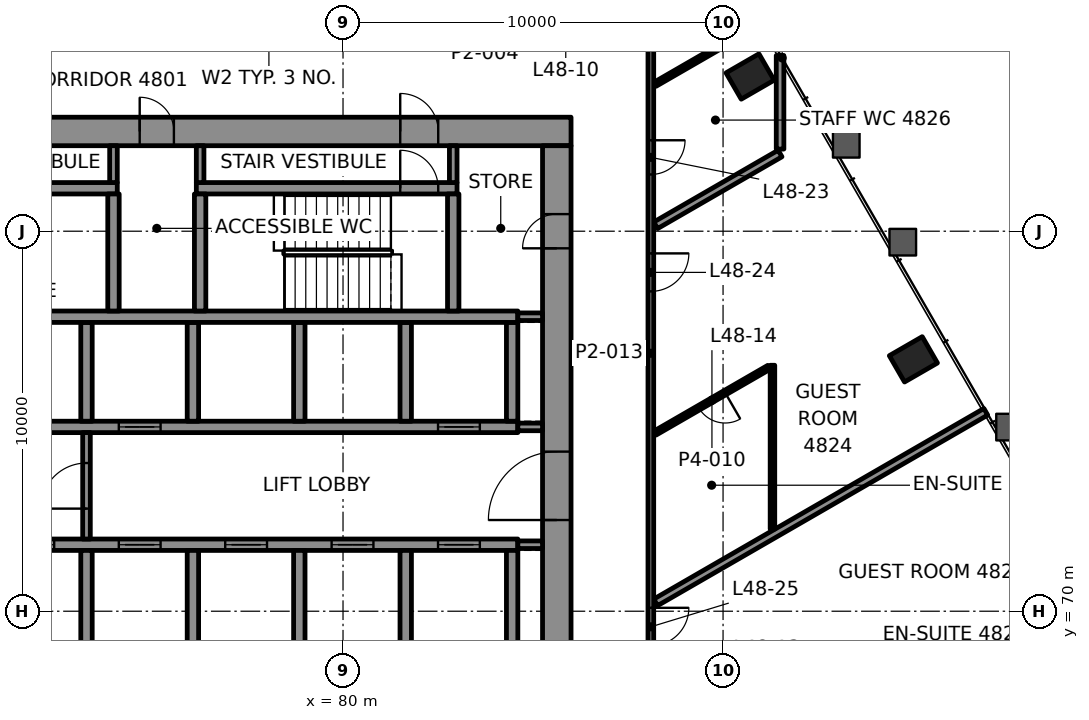
"""IFC4 building model, lengths in metres.
Left out: names, types, materials, properties, quantities, classifications, styles, units other than length and angle.
Written with IfcOpenShell. Run it as: python <this file> out.ifc"""

import sys

from ifc_helpers import new_model, si_unit, direction, frame, frame_2d, origin, origin_2d, place, context, subcontext, project, spatial, rectangle, hollow_rectangle, extrude, element, fill, save


model = new_model("IFC4")
c1 = context("Model", 3, precision=1e-05, world=origin(), true_north=direction((0.0, 1.0)))
c2 = subcontext(c1, "Body", "Model", "MODEL_VIEW")
j1 = project(units=[si_unit("LENGTHUNIT", "METRE"), si_unit("PLANEANGLEUNIT", "RADIAN")], contexts=[c1])
p1 = place(None, origin())
s1 = spatial("IfcSite", under=j1, at=p1, CompositionType="ELEMENT")
p2 = place(p1, origin())
s2 = spatial("IfcBuilding", under=s1, at=p2, CompositionType="ELEMENT")
p3 = place(p2, frame((0.0, 0.0, 206.5)))
s3 = spatial("IfcBuildingStorey", under=s2, at=p3, CompositionType="ELEMENT", Elevation=206.5)
for number, where, z_axis, x_axis in (
    (1, (95.008, 76.628, -0.0), (0.0, 0.0, 1.0), (-0.5, 0.866, 0.0)),
    (2, (90.711, 84.071, -0.0), (0.0, 0.0, 1.0), (-0.5, 0.866, 0.0)),
):
    element("IfcColumn", number, at=place(p3, frame(where, z_axis=z_axis, x_axis=x_axis)), inside=s3, PredefinedType="COLUMN", context=c2, shape_type="SweptSolid", body=[
        extrude(hollow_rectangle(XDim=0.8, YDim=1.0, WallThickness=0.05, at=origin_2d()), origin(), (0.0, 0.0, 1.0), 3.9),
    ])
p4 = place(p3, frame((64.0, 82.625, 0.0), z_axis=(0.0, 0.0, 1.0), x_axis=(1.0, 0.0, 0.0)))
e3 = element("IfcWall", 3, at=p4, inside=s3, PredefinedType="SHEAR", context=c2, shape_type="SweptSolid", body=[
    extrude(rectangle(XDim=22.0, YDim=0.75, at=frame_2d((11.0, 0.0))), origin(), (0.0, 0.0, 1.0), 3.7),
])
p5 = place(p4, frame((3.695, 0.0, 0.0)))
e4 = element("IfcOpeningElement", 4, at=p5, cuts=e3, PredefinedType="OPENING", context=c2, shape_type="SweptSolid", body=[
    extrude(rectangle(XDim=1.0, YDim=2.1, at=frame_2d((0.5, 1.05))), frame((0.0, 0.385, 0.0), z_axis=(0.0, -1.0, 0.0), x_axis=(1.0, 0.0, 0.0)), (0.0, 0.0, 1.0), 0.77),
])
p6 = place(p4, frame((17.505, 0.0, 0.0)))
e5 = element("IfcOpeningElement", 5, at=p6, cuts=e3, PredefinedType="OPENING", context=c2, shape_type="SweptSolid", body=[
    extrude(rectangle(XDim=1.0, YDim=2.1, at=frame_2d((0.5, 1.05))), frame((0.0, 0.385, 0.0), z_axis=(0.0, -1.0, 0.0), x_axis=(1.0, 0.0, 0.0)), (0.0, 0.0, 1.0), 0.77),
])
p7 = place(p4, frame((10.65, 0.0, 0.0)))
e6 = element("IfcOpeningElement", 6, at=p7, cuts=e3, PredefinedType="OPENING", context=c2, shape_type="SweptSolid", body=[
    extrude(rectangle(XDim=0.9, YDim=2.1, at=frame_2d((0.45, 1.05))), frame((0.0, 0.385, 0.0), z_axis=(0.0, -1.0, 0.0), x_axis=(1.0, 0.0, 0.0)), (0.0, 0.0, 1.0), 0.77),
])
p8 = place(p3, frame((85.625, 67.75, 0.0), z_axis=(0.0, 0.0, 1.0), x_axis=(0.0, 1.0, 0.0)))
e7 = element("IfcWall", 7, at=p8, inside=s3, PredefinedType="SHEAR", context=c2, shape_type="SweptSolid", body=[
    extrude(rectangle(XDim=14.5, YDim=0.75, at=frame_2d((7.25, 0.0))), origin(), (0.0, 0.0, 1.0), 3.7),
])
p9 = place(p8, frame((4.65, 0.0, 0.0)))
e8 = element("IfcOpeningElement", 8, at=p9, cuts=e7, PredefinedType="OPENING", context=c2, shape_type="SweptSolid", body=[
    extrude(rectangle(XDim=1.8, YDim=2.1, at=frame_2d((0.9, 1.05))), frame((0.0, 0.385, 0.0), z_axis=(0.0, -1.0, 0.0), x_axis=(1.0, 0.0, 0.0)), (0.0, 0.0, 1.0), 0.77),
])
p10 = place(p8, frame((11.8, 0.0, 0.0)))
e9 = element("IfcOpeningElement", 9, at=p10, cuts=e7, PredefinedType="OPENING", context=c2, shape_type="SweptSolid", body=[
    extrude(rectangle(XDim=0.9, YDim=2.1, at=frame_2d((0.45, 1.05))), frame((0.0, 0.385, 0.0), z_axis=(0.0, -1.0, 0.0), x_axis=(1.0, 0.0, 0.0)), (0.0, 0.0, 1.0), 0.77),
])
p11 = place(p3, frame((70.3, 71.75, 0.0), z_axis=(0.0, 0.0, 1.0), x_axis=(1.0, 0.0, 0.0)))
e10 = element("IfcWall", 10, at=p11, inside=s3, PredefinedType="SHEAR", context=c2, shape_type="SweptSolid", body=[
    extrude(rectangle(XDim=14.3, YDim=0.3, at=frame_2d((7.15, 0.0))), origin(), (0.0, 0.0, 1.0), 3.7),
])
p12 = place(p11, frame((1.0, 0.0, 0.0)))
e11 = element("IfcOpeningElement", 11, at=p12, cuts=e10, PredefinedType="OPENING", context=c2, shape_type="SweptSolid", body=[
    extrude(rectangle(XDim=1.1, YDim=2.1, at=frame_2d((0.55, 1.05))), frame((0.0, 0.16, 0.0), z_axis=(0.0, -1.0, 0.0), x_axis=(1.0, 0.0, 0.0)), (0.0, 0.0, 1.0), 0.32),
])
p13 = place(p11, frame((3.8, 0.0, 0.0)))
e12 = element("IfcOpeningElement", 12, at=p13, cuts=e10, PredefinedType="OPENING", context=c2, shape_type="SweptSolid", body=[
    extrude(rectangle(XDim=1.1, YDim=2.1, at=frame_2d((0.55, 1.05))), frame((0.0, 0.16, 0.0), z_axis=(0.0, -1.0, 0.0), x_axis=(1.0, 0.0, 0.0)), (0.0, 0.0, 1.0), 0.32),
])
p14 = place(p11, frame((6.6, 0.0, 0.0)))
e13 = element("IfcOpeningElement", 13, at=p14, cuts=e10, PredefinedType="OPENING", context=c2, shape_type="SweptSolid", body=[
    extrude(rectangle(XDim=1.1, YDim=2.1, at=frame_2d((0.55, 1.05))), frame((0.0, 0.16, 0.0), z_axis=(0.0, -1.0, 0.0), x_axis=(1.0, 0.0, 0.0)), (0.0, 0.0, 1.0), 0.32),
])
p15 = place(p11, frame((9.4, 0.0, 0.0)))
e14 = element("IfcOpeningElement", 14, at=p15, cuts=e10, PredefinedType="OPENING", context=c2, shape_type="SweptSolid", body=[
    extrude(rectangle(XDim=1.1, YDim=2.1, at=frame_2d((0.55, 1.05))), frame((0.0, 0.16, 0.0), z_axis=(0.0, -1.0, 0.0), x_axis=(1.0, 0.0, 0.0)), (0.0, 0.0, 1.0), 0.32),
])
p16 = place(p11, frame((12.2, 0.0, 0.0)))
e15 = element("IfcOpeningElement", 15, at=p16, cuts=e10, PredefinedType="OPENING", context=c2, shape_type="SweptSolid", body=[
    extrude(rectangle(XDim=1.1, YDim=2.1, at=frame_2d((0.55, 1.05))), frame((0.0, 0.16, 0.0), z_axis=(0.0, -1.0, 0.0), x_axis=(1.0, 0.0, 0.0)), (0.0, 0.0, 1.0), 0.32),
])
p17 = place(p3, frame((70.3, 74.85, 0.0), z_axis=(0.0, 0.0, 1.0), x_axis=(1.0, 0.0, 0.0)))
e16 = element("IfcWall", 16, at=p17, inside=s3, PredefinedType="SHEAR", context=c2, shape_type="SweptSolid", body=[
    extrude(rectangle(XDim=14.3, YDim=0.3, at=frame_2d((7.15, 0.0))), origin(), (0.0, 0.0, 1.0), 3.7),
])
p18 = place(p17, frame((3.8, 0.0, 0.0)))
e17 = element("IfcOpeningElement", 17, at=p18, cuts=e16, PredefinedType="OPENING", context=c2, shape_type="SweptSolid", body=[
    extrude(rectangle(XDim=1.1, YDim=2.1, at=frame_2d((0.55, 1.05))), frame((0.0, 0.16, 0.0), z_axis=(0.0, -1.0, 0.0), x_axis=(1.0, 0.0, 0.0)), (0.0, 0.0, 1.0), 0.32),
])
p19 = place(p17, frame((12.2, 0.0, 0.0)))
e18 = element("IfcOpeningElement", 18, at=p19, cuts=e16, PredefinedType="OPENING", context=c2, shape_type="SweptSolid", body=[
    extrude(rectangle(XDim=1.1, YDim=2.1, at=frame_2d((0.55, 1.05))), frame((0.0, 0.16, 0.0), z_axis=(0.0, -1.0, 0.0), x_axis=(1.0, 0.0, 0.0)), (0.0, 0.0, 1.0), 0.32),
])
for number, where, z_axis, x_axis in (
    (19, (73.25, 69.0, 0.0), (0.0, 0.0, 1.0), (0.0, 1.0, 0.0)),
    (20, (73.25, 75.0, 0.0), (0.0, 0.0, 1.0), (0.0, 1.0, 0.0)),
    (21, (76.05, 69.0, 0.0), (0.0, 0.0, 1.0), (0.0, 1.0, 0.0)),
    (22, (76.05, 75.0, 0.0), (0.0, 0.0, 1.0), (0.0, 1.0, 0.0)),
    (23, (78.85, 69.0, 0.0), (0.0, 0.0, 1.0), (0.0, 1.0, 0.0)),
    (24, (78.85, 75.0, 0.0), (0.0, 0.0, 1.0), (0.0, 1.0, 0.0)),
    (25, (81.65, 69.0, 0.0), (0.0, 0.0, 1.0), (0.0, 1.0, 0.0)),
    (26, (81.65, 75.0, 0.0), (0.0, 0.0, 1.0), (0.0, 1.0, 0.0)),
    (27, (84.45, 69.0, 0.0), (0.0, 0.0, 1.0), (0.0, 1.0, 0.0)),
    (28, (84.45, 75.0, 0.0), (0.0, 0.0, 1.0), (0.0, 1.0, 0.0)),
):
    element("IfcWall", number, at=place(p3, frame(where, z_axis=z_axis, x_axis=x_axis)), inside=s3, PredefinedType="SHEAR", context=c2, shape_type="SweptSolid", body=[
        extrude(rectangle(XDim=2.6, YDim=0.3, at=frame_2d((1.3, 0.0))), origin(), (0.0, 0.0, 1.0), 3.7),
    ])
p20 = place(p3, frame((67.15, 77.75, 0.0), z_axis=(0.0, 0.0, 1.0), x_axis=(1.0, 0.0, 0.0)))
e29 = element("IfcWall", 29, at=p20, inside=s3, PredefinedType="SHEAR", context=c2, shape_type="SweptSolid", body=[
    extrude(rectangle(XDim=17.45, YDim=0.3, at=frame_2d((8.725, 0.0))), origin(), (0.0, 0.0, 1.0), 3.7),
])
p21 = place(p20, frame((0.545, 0.0, 0.0)))
e30 = element("IfcOpeningElement", 30, at=p21, cuts=e29, PredefinedType="OPENING", context=c2, shape_type="SweptSolid", body=[
    extrude(rectangle(XDim=1.0, YDim=2.1, at=frame_2d((0.5, 1.05))), frame((0.0, 0.16, 0.0), z_axis=(0.0, -1.0, 0.0), x_axis=(1.0, 0.0, 0.0)), (0.0, 0.0, 1.0), 0.32),
])
p22 = place(p3, frame((67.15, 81.13, 0.0), z_axis=(0.0, 0.0, 1.0), x_axis=(1.0, 0.0, 0.0)))
e31 = element("IfcWall", 31, at=p22, inside=s3, PredefinedType="SHEAR", context=c2, shape_type="SweptSolid", body=[
    extrude(rectangle(XDim=6.91, YDim=0.3, at=frame_2d((3.455, 0.0))), origin(), (0.0, 0.0, 1.0), 3.7),
])
p23 = place(p22, frame((0.545, 0.0, 0.0)))
e32 = element("IfcOpeningElement", 32, at=p23, cuts=e31, PredefinedType="OPENING", context=c2, shape_type="SweptSolid", body=[
    extrude(rectangle(XDim=1.0, YDim=2.1, at=frame_2d((0.5, 1.05))), frame((0.0, 0.16, 0.0), z_axis=(0.0, -1.0, 0.0), x_axis=(1.0, 0.0, 0.0)), (0.0, 0.0, 1.0), 0.32),
])
p24 = place(p3, frame((76.14, 81.13, 0.0), z_axis=(0.0, 0.0, 1.0), x_axis=(1.0, 0.0, 0.0)))
e33 = element("IfcWall", 33, at=p24, inside=s3, PredefinedType="SHEAR", context=c2, shape_type="SweptSolid", body=[
    extrude(rectangle(XDim=6.86, YDim=0.3, at=frame_2d((3.43, 0.0))), origin(), (0.0, 0.0, 1.0), 3.7),
])
p25 = place(p24, frame((5.365, 0.0, 0.0)))
e34 = element("IfcOpeningElement", 34, at=p25, cuts=e33, PredefinedType="OPENING", context=c2, shape_type="SweptSolid", body=[
    extrude(rectangle(XDim=1.0, YDim=2.1, at=frame_2d((0.5, 1.05))), frame((0.0, 0.16, 0.0), z_axis=(0.0, -1.0, 0.0), x_axis=(1.0, 0.0, 0.0)), (0.0, 0.0, 1.0), 0.32),
])
for number, where, z_axis, x_axis in (
    (35, (73.96, 77.9, 0.0), (0.0, 0.0, 1.0), (0.0, 1.0, 0.0)),
    (36, (76.24, 77.9, 0.0), (0.0, 0.0, 1.0), (0.0, 1.0, 0.0)),
    (37, (82.9, 77.9, 0.0), (0.0, 0.0, 1.0), (0.0, 1.0, 0.0)),
):
    element("IfcWall", number, at=place(p3, frame(where, z_axis=z_axis, x_axis=x_axis)), inside=s3, PredefinedType="SHEAR", context=c2, shape_type="SweptSolid", body=[
        extrude(rectangle(XDim=3.08, YDim=0.3, at=frame_2d((1.54, 0.0))), origin(), (0.0, 0.0, 1.0), 3.7),
    ])
p26 = place(p3, frame((88.227, 70.233, 0.0), z_axis=(0.0, 0.0, 1.0), x_axis=(0.866032780528, 0.499987222889, 0.0)))
e38 = element("IfcWall", 38, at=p26, inside=s3, PredefinedType="PARTITIONING", context=c2, shape_type="SweptSolid", body=[
    extrude(rectangle(XDim=10.031, YDim=0.2, at=frame_2d((5.015, 0.0))), origin(), (0.0, 0.0, 1.0), 3.022),
])
p27 = place(p3, frame((91.205, 76.418, 0.0), z_axis=(0.0, 0.0, 1.0), x_axis=(-0.865997524453, -0.50004828531, 0.0)))
e39 = element("IfcWall", 39, at=p27, inside=s3, PredefinedType="PARTITIONING", context=c2, shape_type="SweptSolid", body=[
    extrude(rectangle(XDim=3.459, YDim=0.12, at=frame_2d((1.729, 0.0))), origin(), (0.0, 0.0, 1.0), 3.1),
])
p28 = place(p27, frame((1.33, 0.0, 0.0)))
e40 = element("IfcOpeningElement", 40, at=p28, cuts=e39, PredefinedType="OPENING", context=c2, shape_type="SweptSolid", body=[
    extrude(rectangle(XDim=0.8, YDim=2.1, at=frame_2d((0.4, 1.05))), frame((0.0, 0.07, 0.0), z_axis=(0.0, -1.0, 0.0), x_axis=(1.0, 0.0, 0.0)), (0.0, 0.0, 1.0), 0.14),
])
p29 = place(p3, frame((88.227, 80.155, 0.0), z_axis=(0.0, 0.0, 1.0), x_axis=(0.86599624775, 0.500050496333, 0.0)))
e41 = element("IfcWall", 41, at=p29, inside=s3, PredefinedType="PARTITIONING", context=c2, shape_type="SweptSolid", body=[
    extrude(rectangle(XDim=3.779, YDim=0.2, at=frame_2d((1.89, 0.0))), origin(), (0.0, 0.0, 1.0), 3.1),
])
p30 = place(p3, frame((88.21, 83.867, 0.0), z_axis=(0.0, 0.0, 1.0), x_axis=(0.86605210011, 0.499953757757, 0.0)))
e42 = element("IfcWall", 42, at=p30, inside=s3, PredefinedType="PARTITIONING", context=c2, shape_type="SweptSolid", body=[
    extrude(rectangle(XDim=3.228, YDim=0.12, at=frame_2d((1.614, 0.0))), origin(), (0.0, 0.0, 1.0), 3.022),
])
p31 = place(p3, frame((91.5, 82.161, 0.0), z_axis=(0.0, 0.0, 1.0), x_axis=(0.0, 1.0, 0.0)))
e43 = element("IfcWall", 43, at=p31, inside=s3, PredefinedType="PARTITIONING", context=c2, shape_type="SweptSolid", body=[
    extrude(rectangle(XDim=2.464, YDim=0.2, at=frame_2d((1.232, 0.0))), origin(), (0.0, 0.0, 1.0), 3.022),
])
p32 = place(p3, frame((91.3, 72.162, 0.0), z_axis=(0.0, 0.0, 1.0), x_axis=(0.0, 1.0, 0.0)))
e44 = element("IfcWall", 44, at=p32, inside=s3, PredefinedType="PARTITIONING", context=c2, shape_type="SweptSolid", body=[
    extrude(rectangle(XDim=4.31, YDim=0.12, at=frame_2d((2.155, 0.0))), origin(), (0.0, 0.0, 1.0), 3.1),
])
p33 = place(p3, frame((88.1, 85.1, 0.0), z_axis=(0.0, 0.0, 1.0), x_axis=(0.0, -1.0, 0.0)))
e45 = element("IfcWall", 45, at=p33, inside=s3, PredefinedType="PARTITIONING", context=c2, shape_type="SweptSolid", body=[
    extrude(rectangle(XDim=16.624, YDim=0.15, at=frame_2d((8.312, 0.0))), origin(), (0.0, 0.0, 1.0), 3.1),
])
p34 = place(p33, frame((2.707, 0.0, 0.0)))
e46 = element("IfcOpeningElement", 46, at=p34, cuts=e45, PredefinedType="OPENING", context=c2, shape_type="SweptSolid", body=[
    extrude(rectangle(XDim=0.9, YDim=2.1, at=frame_2d((0.45, 1.05))), frame((0.0, 0.085, 0.0), z_axis=(0.0, -1.0, 0.0), x_axis=(1.0, 0.0, 0.0)), (0.0, 0.0, 1.0), 0.17),
])
p35 = place(p33, frame((5.684, 0.0, 0.0)))
e47 = element("IfcOpeningElement", 47, at=p35, cuts=e45, PredefinedType="OPENING", context=c2, shape_type="SweptSolid", body=[
    extrude(rectangle(XDim=1.0, YDim=2.1, at=frame_2d((0.5, 1.05))), frame((0.0, 0.085, 0.0), z_axis=(0.0, -1.0, 0.0), x_axis=(1.0, 0.0, 0.0)), (0.0, 0.0, 1.0), 0.17),
])
p36 = place(p33, frame((15.01, 0.0, 0.0)))
e48 = element("IfcOpeningElement", 48, at=p36, cuts=e45, PredefinedType="OPENING", context=c2, shape_type="SweptSolid", body=[
    extrude(rectangle(XDim=1.0, YDim=2.1, at=frame_2d((0.5, 1.05))), frame((0.0, 0.085, 0.0), z_axis=(0.0, -1.0, 0.0), x_axis=(1.0, 0.0, 0.0)), (0.0, 0.0, 1.0), 0.17),
])
for number, where, z_axis, x_axis in (
    (49, (84.6, 71.75, 0.0), (0.0, 0.0, 1.0), (1.0, 0.0, 0.0)),
    (50, (84.6, 74.85, 0.0), (0.0, 0.0, 1.0), (1.0, 0.0, 0.0)),
    (51, (84.6, 77.75, 0.0), (0.0, 0.0, 1.0), (1.0, 0.0, 0.0)),
):
    element("IfcWall", number, at=place(p3, frame(where, z_axis=z_axis, x_axis=x_axis)), inside=s3, PredefinedType="PARTITIONING", context=c2, shape_type="SweptSolid", body=[
        extrude(rectangle(XDim=0.65, YDim=0.2, at=frame_2d((0.325, 0.0))), origin(), (0.0, 0.0, 1.0), 3.7),
    ])
p37 = place(p3, frame((73.25, 71.9, 0.0), z_axis=(0.0, 0.0, 1.0), x_axis=(0.0, 1.0, 0.0)))
e52 = element("IfcWall", 52, at=p37, inside=s3, PredefinedType="PARTITIONING", context=c2, shape_type="SweptSolid", body=[
    extrude(rectangle(XDim=2.8, YDim=0.2, at=frame_2d((1.4, 0.0))), origin(), (0.0, 0.0, 1.0), 3.7),
])
p38 = place(p37, frame((0.8, 0.0, 0.0)))
e53 = element("IfcOpeningElement", 53, at=p38, cuts=e52, PredefinedType="OPENING", context=c2, shape_type="SweptSolid", body=[
    extrude(rectangle(XDim=1.2, YDim=2.1, at=frame_2d((0.6, 1.05))), frame((0.0, 0.11, 0.0), z_axis=(0.0, -1.0, 0.0), x_axis=(1.0, 0.0, 0.0)), (0.0, 0.0, 1.0), 0.22),
])
for number, where, z_axis, x_axis in (
    (54, (73.96, 81.28, 0.0), (0.0, 0.0, 1.0), (0.0, 1.0, 0.0)),
    (55, (76.24, 81.28, 0.0), (0.0, 0.0, 1.0), (0.0, 1.0, 0.0)),
    (56, (82.9, 81.28, 0.0), (0.0, 0.0, 1.0), (0.0, 1.0, 0.0)),
):
    element("IfcWall", number, at=place(p3, frame(where, z_axis=z_axis, x_axis=x_axis)), inside=s3, PredefinedType="PARTITIONING", context=c2, shape_type="SweptSolid", body=[
        extrude(rectangle(XDim=0.97, YDim=0.2, at=frame_2d((0.485, 0.0))), origin(), (0.0, 0.0, 1.0), 3.7),
    ])
p39 = place(p28, origin())
e57 = element("IfcDoor", 57, at=p39, inside=s3, OperationType="SINGLE_SWING_LEFT", PredefinedType="DOOR", context=c2, shape_type="SweptSolid", body=[
    extrude(rectangle(XDim=0.8, YDim=2.1, at=frame_2d((0.4, 1.05))), frame((0.0, 0.025, 0.0), z_axis=(0.0, -1.0, 0.0), x_axis=(1.0, 0.0, 0.0)), (0.0, 0.0, 1.0), 0.05),
])
fill(e40, e57)
p40 = place(p34, origin())
e58 = element("IfcDoor", 58, at=p40, inside=s3, OperationType="SINGLE_SWING_RIGHT", PredefinedType="DOOR", context=c2, shape_type="SweptSolid", body=[
    extrude(rectangle(XDim=0.9, YDim=2.1, at=frame_2d((0.45, 1.05))), frame((0.0, 0.025, 0.0), z_axis=(0.0, -1.0, 0.0), x_axis=(1.0, 0.0, 0.0)), (0.0, 0.0, 1.0), 0.05),
])
fill(e46, e58)
p41 = place(p35, origin())
e59 = element("IfcDoor", 59, at=p41, inside=s3, OperationType="SINGLE_SWING_RIGHT", PredefinedType="DOOR", context=c2, shape_type="SweptSolid", body=[
    extrude(rectangle(XDim=1.0, YDim=2.1, at=frame_2d((0.5, 1.05))), frame((0.0, 0.025, 0.0), z_axis=(0.0, -1.0, 0.0), x_axis=(1.0, 0.0, 0.0)), (0.0, 0.0, 1.0), 0.05),
])
fill(e47, e59)
p42 = place(p36, origin())
e60 = element("IfcDoor", 60, at=p42, inside=s3, OperationType="SINGLE_SWING_RIGHT", PredefinedType="DOOR", context=c2, shape_type="SweptSolid", body=[
    extrude(rectangle(XDim=1.0, YDim=2.1, at=frame_2d((0.5, 1.05))), frame((0.0, 0.025, 0.0), z_axis=(0.0, -1.0, 0.0), x_axis=(1.0, 0.0, 0.0)), (0.0, 0.0, 1.0), 0.05),
])
fill(e48, e60)
p43 = place(p12, origin())
e61 = element("IfcDoor", 61, at=p43, inside=s3, OperationType="DOUBLE_DOOR_SLIDING", PredefinedType="DOOR", context=c2, shape_type="SweptSolid", body=[
    extrude(rectangle(XDim=1.1, YDim=2.1, at=frame_2d((0.55, 1.05))), frame((0.0, 0.025, 0.0), z_axis=(0.0, -1.0, 0.0), x_axis=(1.0, 0.0, 0.0)), (0.0, 0.0, 1.0), 0.05),
])
fill(e11, e61)
p44 = place(p13, origin())
e62 = element("IfcDoor", 62, at=p44, inside=s3, OperationType="DOUBLE_DOOR_SLIDING", PredefinedType="DOOR", context=c2, shape_type="SweptSolid", body=[
    extrude(rectangle(XDim=1.1, YDim=2.1, at=frame_2d((0.55, 1.05))), frame((0.0, 0.025, 0.0), z_axis=(0.0, -1.0, 0.0), x_axis=(1.0, 0.0, 0.0)), (0.0, 0.0, 1.0), 0.05),
])
fill(e12, e62)
p45 = place(p14, origin())
e63 = element("IfcDoor", 63, at=p45, inside=s3, OperationType="DOUBLE_DOOR_SLIDING", PredefinedType="DOOR", context=c2, shape_type="SweptSolid", body=[
    extrude(rectangle(XDim=1.1, YDim=2.1, at=frame_2d((0.55, 1.05))), frame((0.0, 0.025, 0.0), z_axis=(0.0, -1.0, 0.0), x_axis=(1.0, 0.0, 0.0)), (0.0, 0.0, 1.0), 0.05),
])
fill(e13, e63)
p46 = place(p15, origin())
e64 = element("IfcDoor", 64, at=p46, inside=s3, OperationType="DOUBLE_DOOR_SLIDING", PredefinedType="DOOR", context=c2, shape_type="SweptSolid", body=[
    extrude(rectangle(XDim=1.1, YDim=2.1, at=frame_2d((0.55, 1.05))), frame((0.0, 0.025, 0.0), z_axis=(0.0, -1.0, 0.0), x_axis=(1.0, 0.0, 0.0)), (0.0, 0.0, 1.0), 0.05),
])
fill(e14, e64)
p47 = place(p16, origin())
e65 = element("IfcDoor", 65, at=p47, inside=s3, OperationType="DOUBLE_DOOR_SLIDING", PredefinedType="DOOR", context=c2, shape_type="SweptSolid", body=[
    extrude(rectangle(XDim=1.1, YDim=2.1, at=frame_2d((0.55, 1.05))), frame((0.0, 0.025, 0.0), z_axis=(0.0, -1.0, 0.0), x_axis=(1.0, 0.0, 0.0)), (0.0, 0.0, 1.0), 0.05),
])
fill(e15, e65)
p48 = place(p18, origin())
e66 = element("IfcDoor", 66, at=p48, inside=s3, OperationType="DOUBLE_DOOR_SLIDING", PredefinedType="DOOR", context=c2, shape_type="SweptSolid", body=[
    extrude(rectangle(XDim=1.1, YDim=2.1, at=frame_2d((0.55, 1.05))), frame((0.0, 0.025, 0.0), z_axis=(0.0, -1.0, 0.0), x_axis=(1.0, 0.0, 0.0)), (0.0, 0.0, 1.0), 0.05),
])
fill(e17, e66)
p49 = place(p19, origin())
e67 = element("IfcDoor", 67, at=p49, inside=s3, OperationType="DOUBLE_DOOR_SLIDING", PredefinedType="DOOR", context=c2, shape_type="SweptSolid", body=[
    extrude(rectangle(XDim=1.1, YDim=2.1, at=frame_2d((0.55, 1.05))), frame((0.0, 0.025, 0.0), z_axis=(0.0, -1.0, 0.0), x_axis=(1.0, 0.0, 0.0)), (0.0, 0.0, 1.0), 0.05),
])
fill(e18, e67)
p50 = place(p25, origin())
e68 = element("IfcDoor", 68, at=p50, inside=s3, OperationType="SINGLE_SWING_RIGHT", PredefinedType="DOOR", context=c2, shape_type="SweptSolid", body=[
    extrude(rectangle(XDim=1.0, YDim=2.1, at=frame_2d((0.5, 1.05))), frame((0.0, 0.025, 0.0), z_axis=(0.0, -1.0, 0.0), x_axis=(1.0, 0.0, 0.0)), (0.0, 0.0, 1.0), 0.05),
])
fill(e34, e68)
p51 = place(p6, origin())
e69 = element("IfcDoor", 69, at=p51, inside=s3, OperationType="SINGLE_SWING_LEFT", PredefinedType="DOOR", context=c2, shape_type="SweptSolid", body=[
    extrude(rectangle(XDim=1.0, YDim=2.1, at=frame_2d((0.5, 1.05))), frame((0.0, 0.095, 0.0), z_axis=(0.0, -1.0, 0.0), x_axis=(1.0, 0.0, 0.0)), (0.0, 0.0, 1.0), 0.19),
])
fill(e5, e69)
p52 = place(p38, origin())
e70 = element("IfcDoor", 70, at=p52, inside=s3, OperationType="SINGLE_SWING_LEFT", PredefinedType="DOOR", context=c2, shape_type="SweptSolid", body=[
    extrude(rectangle(XDim=1.2, YDim=2.1, at=frame_2d((0.6, 1.05))), frame((0.0, 0.025, 0.0), z_axis=(0.0, -1.0, 0.0), x_axis=(1.0, 0.0, 0.0)), (0.0, 0.0, 1.0), 0.05),
])
fill(e53, e70)
p53 = place(p9, origin())
e71 = element("IfcDoor", 71, at=p53, inside=s3, OperationType="SINGLE_SWING_RIGHT", PredefinedType="DOOR", context=c2, shape_type="SweptSolid", body=[
    extrude(rectangle(XDim=1.8, YDim=2.1, at=frame_2d((0.9, 1.05))), frame((0.0, 0.095, 0.0), z_axis=(0.0, -1.0, 0.0), x_axis=(1.0, 0.0, 0.0)), (0.0, 0.0, 1.0), 0.19),
])
fill(e8, e71)
p54 = place(p7, origin())
e72 = element("IfcDoor", 72, at=p54, inside=s3, OperationType="SINGLE_SWING_LEFT", PredefinedType="DOOR", context=c2, shape_type="SweptSolid", body=[
    extrude(rectangle(XDim=0.9, YDim=2.1, at=frame_2d((0.45, 1.05))), frame((0.0, 0.095, 0.0), z_axis=(0.0, -1.0, 0.0), x_axis=(1.0, 0.0, 0.0)), (0.0, 0.0, 1.0), 0.19),
])
fill(e6, e72)
p55 = place(p10, origin())
e73 = element("IfcDoor", 73, at=p55, inside=s3, OperationType="SINGLE_SWING_RIGHT", PredefinedType="DOOR", context=c2, shape_type="SweptSolid", body=[
    extrude(rectangle(XDim=0.9, YDim=2.1, at=frame_2d((0.45, 1.05))), frame((0.0, 0.095, 0.0), z_axis=(0.0, -1.0, 0.0), x_axis=(1.0, 0.0, 0.0)), (0.0, 0.0, 1.0), 0.19),
])
fill(e9, e73)
save(model, sys.argv[1])
